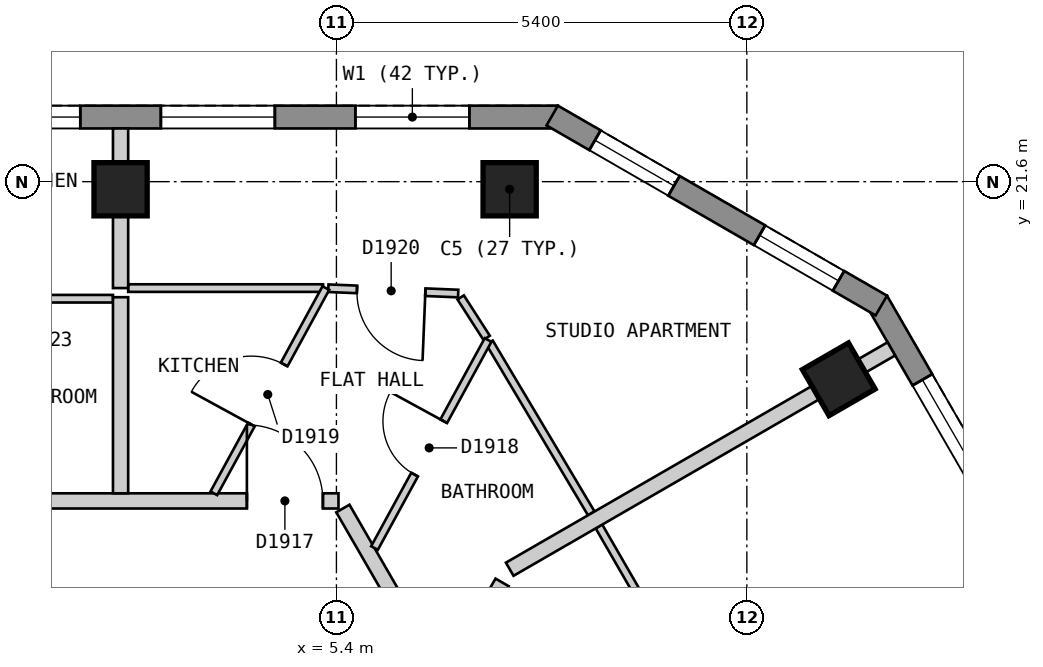
"""IFC4 building model, lengths in metres.
Left out: names, types, materials, properties, quantities, classifications, styles, units other than length and angle.
Written with IfcOpenShell. Run it as: python <this file> out.ifc"""

import sys

from ifc_helpers import new_model, si_unit, direction, frame, frame_2d, origin, origin_2d, place, context, subcontext, project, spatial, polyline, rectangle, outline, extrude, element, fill, save


model = new_model("IFC4")
c1 = context("Model", 3, precision=1e-05, world=origin(), true_north=direction((0.0, 1.0)))
c2 = subcontext(c1, "Body", "Model", "MODEL_VIEW")
j1 = project(units=[si_unit("LENGTHUNIT", "METRE"), si_unit("PLANEANGLEUNIT", "RADIAN")], contexts=[c1])
p1 = place(None, origin())
s1 = spatial("IfcSite", under=j1, at=p1, CompositionType="ELEMENT")
p2 = place(p1, origin())
s2 = spatial("IfcBuilding", under=s1, at=p2, CompositionType="ELEMENT")
p3 = place(p2, frame((0.0, 0.0, 220.8)))
s3 = spatial("IfcBuildingStorey", under=s2, at=p3, CompositionType="ELEMENT", Elevation=220.8)
for number, where, z_axis, x_axis in (
    (1, (7.679, 21.5, 0.0), (0.0, 0.0, 1.0), (-1.0, 0.0, 0.0)),
    (2, (2.56, 21.5, 0.0), (0.0, 0.0, 1.0), (-1.0, 0.0, 0.0)),
    (3, (12.009, 19.0, 0.0), (0.0, 0.0, 1.0), (-0.5, 0.866, 0.0)),
):
    element("IfcColumn", number, at=place(p3, frame(where, z_axis=z_axis, x_axis=x_axis)), inside=s3, PredefinedType="COLUMN", context=c2, shape_type="SweptSolid", body=[
        extrude(rectangle(XDim=0.7, YDim=0.7, at=origin_2d()), origin(), (0.0, 0.0, 1.0), 3.0),
    ])
p4 = place(p3, frame((8.314, 22.45, 0.0), z_axis=(0.0, 0.0, 1.0), x_axis=(-1.0, 0.0, 0.0)))
e4 = element("IfcWall", 4, at=p4, inside=s3, PredefinedType="SOLIDWALL", context=c2, shape_type="SweptSolid", body=[
    extrude(outline(polyline([(0.0, -0.15), (16.628, -0.15), (16.548, 0.15), (0.08, 0.15), (0.0, -0.15)])), origin(), (0.0, 0.0, 1.0), 2.7),
])
p5 = place(p4, frame((1.165, 0.0, 0.15)))
e5 = element("IfcOpeningElement", 5, at=p5, cuts=e4, PredefinedType="OPENING", context=c2, shape_type="SweptSolid", body=[
    extrude(rectangle(XDim=1.5, YDim=2.1, at=frame_2d((0.75, 1.05))), frame((0.0, 0.16, 0.0), z_axis=(0.0, -1.0, 0.0), x_axis=(1.0, 0.0, 0.0)), (0.0, 0.0, 1.0), 0.32),
])
p6 = place(p4, frame((3.724, 0.0, 0.15)))
e6 = element("IfcOpeningElement", 6, at=p6, cuts=e4, PredefinedType="OPENING", context=c2, shape_type="SweptSolid", body=[
    extrude(rectangle(XDim=1.5, YDim=2.1, at=frame_2d((0.75, 1.05))), frame((0.0, 0.16, 0.0), z_axis=(0.0, -1.0, 0.0), x_axis=(1.0, 0.0, 0.0)), (0.0, 0.0, 1.0), 0.32),
])
p7 = place(p4, frame((6.284, 0.0, 0.15)))
e7 = element("IfcOpeningElement", 7, at=p7, cuts=e4, PredefinedType="OPENING", context=c2, shape_type="SweptSolid", body=[
    extrude(rectangle(XDim=1.5, YDim=2.1, at=frame_2d((0.75, 1.05))), frame((0.0, 0.16, 0.0), z_axis=(0.0, -1.0, 0.0), x_axis=(1.0, 0.0, 0.0)), (0.0, 0.0, 1.0), 0.32),
])
p8 = place(p4, frame((8.843, 0.0, 0.15)))
e8 = element("IfcOpeningElement", 8, at=p8, cuts=e4, PredefinedType="OPENING", context=c2, shape_type="SweptSolid", body=[
    extrude(rectangle(XDim=1.5, YDim=2.1, at=frame_2d((0.75, 1.05))), frame((0.0, 0.16, 0.0), z_axis=(0.0, -1.0, 0.0), x_axis=(1.0, 0.0, 0.0)), (0.0, 0.0, 1.0), 0.32),
])
p9 = place(p4, frame((11.403, 0.0, 0.15)))
e9 = element("IfcOpeningElement", 9, at=p9, cuts=e4, PredefinedType="OPENING", context=c2, shape_type="SweptSolid", body=[
    extrude(rectangle(XDim=1.5, YDim=2.1, at=frame_2d((0.75, 1.05))), frame((0.0, 0.16, 0.0), z_axis=(0.0, -1.0, 0.0), x_axis=(1.0, 0.0, 0.0)), (0.0, 0.0, 1.0), 0.32),
])
p10 = place(p4, frame((13.962, 0.0, 0.15)))
e10 = element("IfcOpeningElement", 10, at=p10, cuts=e4, PredefinedType="OPENING", context=c2, shape_type="SweptSolid", body=[
    extrude(rectangle(XDim=1.5, YDim=2.1, at=frame_2d((0.75, 1.05))), frame((0.0, 0.16, 0.0), z_axis=(0.0, -1.0, 0.0), x_axis=(1.0, 0.0, 0.0)), (0.0, 0.0, 1.0), 0.32),
])
p11 = place(p3, frame((23.599, 0.825, 0.0), z_axis=(0.0, 0.0, 1.0), x_axis=(-0.500003656944, 0.866023292436, 0.0)))
e11 = element("IfcWall", 11, at=p11, inside=s3, PredefinedType="SOLIDWALL", context=c2, shape_type="SweptSolid", body=[
    extrude(outline(polyline([(0.0, -0.15), (22.17, -0.15), (22.09, 0.15), (0.08, 0.15), (0.0, -0.15)])), origin(), (0.0, 0.0, 1.0), 2.7),
])
p12 = place(p11, frame((1.191, 0.0, 0.15)))
e12 = element("IfcOpeningElement", 12, at=p12, cuts=e11, PredefinedType="OPENING", context=c2, shape_type="SweptSolid", body=[
    extrude(rectangle(XDim=1.5, YDim=2.1, at=frame_2d((0.75, 1.05))), frame((0.0, 0.16, 0.0), z_axis=(0.0, -1.0, 0.0), x_axis=(1.0, 0.0, 0.0)), (0.0, 0.0, 1.0), 0.32),
])
p13 = place(p11, frame((3.804, 0.0, 0.15)))
e13 = element("IfcOpeningElement", 13, at=p13, cuts=e11, PredefinedType="OPENING", context=c2, shape_type="SweptSolid", body=[
    extrude(rectangle(XDim=1.5, YDim=2.1, at=frame_2d((0.75, 1.05))), frame((0.0, 0.16, 0.0), z_axis=(0.0, -1.0, 0.0), x_axis=(1.0, 0.0, 0.0)), (0.0, 0.0, 1.0), 0.32),
])
p14 = place(p11, frame((6.417, 0.0, 0.15)))
e14 = element("IfcOpeningElement", 14, at=p14, cuts=e11, PredefinedType="OPENING", context=c2, shape_type="SweptSolid", body=[
    extrude(rectangle(XDim=1.5, YDim=2.1, at=frame_2d((0.75, 1.05))), frame((0.0, 0.16, 0.0), z_axis=(0.0, -1.0, 0.0), x_axis=(1.0, 0.0, 0.0)), (0.0, 0.0, 1.0), 0.32),
])
p15 = place(p11, frame((9.029, 0.0, 0.15)))
e15 = element("IfcOpeningElement", 15, at=p15, cuts=e11, PredefinedType="OPENING", context=c2, shape_type="SweptSolid", body=[
    extrude(rectangle(XDim=1.5, YDim=2.1, at=frame_2d((0.75, 1.05))), frame((0.0, 0.16, 0.0), z_axis=(0.0, -1.0, 0.0), x_axis=(1.0, 0.0, 0.0)), (0.0, 0.0, 1.0), 0.32),
])
p16 = place(p11, frame((11.641, 0.0, 0.15)))
e16 = element("IfcOpeningElement", 16, at=p16, cuts=e11, PredefinedType="OPENING", context=c2, shape_type="SweptSolid", body=[
    extrude(rectangle(XDim=1.5, YDim=2.1, at=frame_2d((0.75, 1.05))), frame((0.0, 0.16, 0.0), z_axis=(0.0, -1.0, 0.0), x_axis=(1.0, 0.0, 0.0)), (0.0, 0.0, 1.0), 0.32),
])
p17 = place(p11, frame((14.254, 0.0, 0.15)))
e17 = element("IfcOpeningElement", 17, at=p17, cuts=e11, PredefinedType="OPENING", context=c2, shape_type="SweptSolid", body=[
    extrude(rectangle(XDim=1.5, YDim=2.1, at=frame_2d((0.75, 1.05))), frame((0.0, 0.16, 0.0), z_axis=(0.0, -1.0, 0.0), x_axis=(1.0, 0.0, 0.0)), (0.0, 0.0, 1.0), 0.32),
])
p18 = place(p11, frame((16.866, 0.0, 0.15)))
e18 = element("IfcOpeningElement", 18, at=p18, cuts=e11, PredefinedType="OPENING", context=c2, shape_type="SweptSolid", body=[
    extrude(rectangle(XDim=1.5, YDim=2.1, at=frame_2d((0.75, 1.05))), frame((0.0, 0.16, 0.0), z_axis=(0.0, -1.0, 0.0), x_axis=(1.0, 0.0, 0.0)), (0.0, 0.0, 1.0), 0.32),
])
p19 = place(p11, frame((19.479, 0.0, 0.15)))
e19 = element("IfcOpeningElement", 19, at=p19, cuts=e11, PredefinedType="OPENING", context=c2, shape_type="SweptSolid", body=[
    extrude(rectangle(XDim=1.5, YDim=2.1, at=frame_2d((0.75, 1.05))), frame((0.0, 0.16, 0.0), z_axis=(0.0, -1.0, 0.0), x_axis=(1.0, 0.0, 0.0)), (0.0, 0.0, 1.0), 0.32),
])
p20 = place(p3, frame((12.569, 19.97, 0.0), z_axis=(0.0, 0.0, 1.0), x_axis=(-0.866022959057, 0.500004234368, 0.0)))
e20 = element("IfcWall", 20, at=p20, inside=s3, PredefinedType="SOLIDWALL", context=c2, shape_type="SweptSolid", body=[
    extrude(outline(polyline([(0.0, -0.15), (5.0, -0.15), (4.92, 0.15), (0.08, 0.15), (0.0, -0.15)])), origin(), (0.0, 0.0, 1.0), 2.7),
])
p21 = place(p20, frame((0.65, 0.0, 0.15)))
e21 = element("IfcOpeningElement", 21, at=p21, cuts=e20, PredefinedType="OPENING", context=c2, shape_type="SweptSolid", body=[
    extrude(rectangle(XDim=1.2, YDim=2.1, at=frame_2d((0.6, 1.05))), frame((0.0, 0.16, 0.0), z_axis=(0.0, -1.0, 0.0), x_axis=(1.0, 0.0, 0.0)), (0.0, 0.0, 1.0), 0.32),
])
p22 = place(p20, frame((3.15, 0.0, 0.15)))
e22 = element("IfcOpeningElement", 22, at=p22, cuts=e20, PredefinedType="OPENING", context=c2, shape_type="SweptSolid", body=[
    extrude(rectangle(XDim=1.2, YDim=2.1, at=frame_2d((0.6, 1.05))), frame((0.0, 0.16, 0.0), z_axis=(0.0, -1.0, 0.0), x_axis=(1.0, 0.0, 0.0)), (0.0, 0.0, 1.0), 0.32),
])
p23 = place(p3, frame((5.485, 17.3, 0.0), z_axis=(0.0, 0.0, 1.0), x_axis=(0.499943285704, -0.866058145322, 0.0)))
e23 = element("IfcWall", 23, at=p23, inside=s3, PredefinedType="PARTITIONING", context=c2, shape_type="SweptSolid", body=[
    extrude(rectangle(XDim=10.623, YDim=0.2, at=frame_2d((5.312, 0.0))), origin(), (0.0, 0.0, 1.0), 2.7),
])
p24 = place(p23, frame((3.901, 0.0, 0.0)))
e24 = element("IfcOpeningElement", 24, at=p24, cuts=e23, PredefinedType="OPENING", context=c2, shape_type="SweptSolid", body=[
    extrude(rectangle(XDim=1.0, YDim=2.1, at=frame_2d((0.5, 1.05))), frame((0.0, 0.11, 0.0), z_axis=(0.0, -1.0, 0.0), x_axis=(1.0, 0.0, 0.0)), (0.0, 0.0, 1.0), 0.22),
])
p25 = place(p3, frame((-5.312, 17.4, 0.0), z_axis=(0.0, 0.0, 1.0), x_axis=(1.0, 0.0, 0.0)))
e25 = element("IfcWall", 25, at=p25, inside=s3, PredefinedType="PARTITIONING", context=c2, shape_type="SweptSolid", body=[
    extrude(rectangle(XDim=10.739, YDim=0.2, at=frame_2d((5.37, 0.0))), origin(), (0.0, 0.0, 1.0), 2.7),
])
p26 = place(p25, frame((9.534, 0.0, 0.0)))
e26 = element("IfcOpeningElement", 26, at=p26, cuts=e25, PredefinedType="OPENING", context=c2, shape_type="SweptSolid", body=[
    extrude(rectangle(XDim=1.0, YDim=2.1, at=frame_2d((0.5, 1.05))), frame((0.0, 0.11, 0.0), z_axis=(0.0, -1.0, 0.0), x_axis=(1.0, 0.0, 0.0)), (0.0, 0.0, 1.0), 0.22),
])
p27 = place(p25, frame((4.812, 0.0, 0.0)))
e27 = element("IfcOpeningElement", 27, at=p27, cuts=e25, PredefinedType="OPENING", context=c2, shape_type="SweptSolid", body=[
    extrude(rectangle(XDim=1.0, YDim=2.1, at=frame_2d((0.5, 1.05))), frame((0.0, 0.11, 0.0), z_axis=(0.0, -1.0, 0.0), x_axis=(1.0, 0.0, 0.0)), (0.0, 0.0, 1.0), 0.22),
])
p28 = place(p25, frame((0.208, 0.0, 0.0)))
e28 = element("IfcOpeningElement", 28, at=p28, cuts=e25, PredefinedType="OPENING", context=c2, shape_type="SweptSolid", body=[
    extrude(rectangle(XDim=0.8, YDim=2.1, at=frame_2d((0.4, 1.05))), frame((0.0, 0.11, 0.0), z_axis=(0.0, -1.0, 0.0), x_axis=(1.0, 0.0, 0.0)), (0.0, 0.0, 1.0), 0.22),
])
p29 = place(p3, frame((7.035, 20.077, 0.0), z_axis=(0.0, 0.0, 1.0), x_axis=(0.540425167977, -0.841392083286, 0.0)))
e29 = element("IfcWall", 29, at=p29, inside=s3, PredefinedType="PARTITIONING", context=c2, shape_type="SweptSolid", body=[
    extrude(rectangle(XDim=0.631, YDim=0.1, at=frame_2d((0.315, 0.0))), origin(), (0.0, 0.0, 1.0), 2.7),
])
p30 = place(p3, frame((7.414, 19.484, 0.0), z_axis=(0.0, 0.0, 1.0), x_axis=(0.511734837015, -0.859143443544, 0.0)))
e30 = element("IfcWall", 30, at=p30, inside=s3, PredefinedType="PARTITIONING", context=c2, shape_type="SweptSolid", body=[
    extrude(rectangle(XDim=2.616, YDim=0.1, at=frame_2d((1.308, 0.0))), origin(), (0.0, 0.0, 1.0), 2.7),
])
p31 = place(p3, frame((8.854, 17.064, 0.0), z_axis=(0.0, 0.0, 1.0), x_axis=(0.500042049778, -0.866001124973, 0.0)))
e31 = element("IfcWall", 31, at=p31, inside=s3, PredefinedType="PARTITIONING", context=c2, shape_type="SweptSolid", body=[
    extrude(rectangle(XDim=5.025, YDim=0.1, at=frame_2d((2.513, 0.0))), origin(), (0.0, 0.0, 1.0), 2.7),
])
p32 = place(p31, frame((2.063, 0.0, 0.0)))
e32 = element("IfcOpeningElement", 32, at=p32, cuts=e31, PredefinedType="OPENING", context=c2, shape_type="SweptSolid", body=[
    extrude(rectangle(XDim=0.9, YDim=2.1, at=frame_2d((0.45, 1.05))), frame((0.0, 0.06, 0.0), z_axis=(0.0, -1.0, 0.0), x_axis=(1.0, 0.0, 0.0)), (0.0, 0.0, 1.0), 0.12),
])
p33 = place(p3, frame((5.294, 20.198, 0.0), z_axis=(0.0, 0.0, 1.0), x_axis=(0.999159599203, -0.040988965834, 0.0)))
e33 = element("IfcWall", 33, at=p33, inside=s3, PredefinedType="PARTITIONING", context=c2, shape_type="SweptSolid", body=[
    extrude(rectangle(XDim=1.709, YDim=0.1, at=frame_2d((0.855, 0.0))), origin(), (0.0, 0.0, 1.0), 2.7),
])
p34 = place(p33, frame((0.377, 0.0, 0.0)))
e34 = element("IfcOpeningElement", 34, at=p34, cuts=e33, PredefinedType="OPENING", context=c2, shape_type="SweptSolid", body=[
    extrude(rectangle(XDim=0.9, YDim=2.1, at=frame_2d((0.45, 1.05))), frame((0.0, 0.06, 0.0), z_axis=(0.0, -1.0, 0.0), x_axis=(1.0, 0.0, 0.0)), (0.0, 0.0, 1.0), 0.12),
])
p35 = place(p3, frame((-0.716, 20.06, 0.0), z_axis=(0.0, 0.0, 1.0), x_axis=(1.0, 0.0, 0.0)))
e35 = element("IfcWall", 35, at=p35, inside=s3, PredefinedType="PARTITIONING", context=c2, shape_type="SweptSolid", body=[
    extrude(rectangle(XDim=3.176, YDim=0.1, at=frame_2d((1.588, 0.0))), origin(), (0.0, 0.0, 1.0), 2.7),
])
p36 = place(p3, frame((2.66, 20.2, 0.0), z_axis=(0.0, 0.0, 1.0), x_axis=(1.0, 0.0, 0.0)))
e36 = element("IfcWall", 36, at=p36, inside=s3, PredefinedType="PARTITIONING", context=c2, shape_type="SweptSolid", body=[
    extrude(rectangle(XDim=2.564, YDim=0.1, at=frame_2d((1.282, 0.0))), origin(), (0.0, 0.0, 1.0), 2.7),
])
p37 = place(p3, frame((3.787, 17.5, 0.0), z_axis=(0.0, 0.0, 1.0), x_axis=(0.479146828267, 0.877734764585, 0.0)))
e37 = element("IfcWall", 37, at=p37, inside=s3, PredefinedType="PARTITIONING", context=c2, shape_type="SweptSolid", body=[
    extrude(rectangle(XDim=3.076, YDim=0.1, at=frame_2d((1.538, 0.0))), origin(), (0.0, 0.0, 1.0), 2.7),
])
p38 = place(p37, frame((1.031, 0.0, 0.0)))
e38 = element("IfcOpeningElement", 38, at=p38, cuts=e37, PredefinedType="OPENING", context=c2, shape_type="SweptSolid", body=[
    extrude(rectangle(XDim=0.9, YDim=2.1, at=frame_2d((0.45, 1.05))), frame((0.0, 0.06, 0.0), z_axis=(0.0, -1.0, 0.0), x_axis=(1.0, 0.0, 0.0)), (0.0, 0.0, 1.0), 0.12),
])
p39 = place(p3, frame((5.901, 16.78, 0.0), z_axis=(0.0, 0.0, 1.0), x_axis=(0.479148317257, 0.877733951759, 0.0)))
e39 = element("IfcWall", 39, at=p39, inside=s3, PredefinedType="PARTITIONING", context=c2, shape_type="SweptSolid", body=[
    extrude(rectangle(XDim=3.118, YDim=0.1, at=frame_2d((1.559, 0.0))), origin(), (0.0, 0.0, 1.0), 2.7),
])
p40 = place(p39, frame((1.101, 0.0, 0.0)))
e40 = element("IfcOpeningElement", 40, at=p40, cuts=e39, PredefinedType="OPENING", context=c2, shape_type="SweptSolid", body=[
    extrude(rectangle(XDim=0.8, YDim=2.1, at=frame_2d((0.4, 1.05))), frame((0.0, 0.06, 0.0), z_axis=(0.0, -1.0, 0.0), x_axis=(1.0, 0.0, 0.0)), (0.0, 0.0, 1.0), 0.12),
])
p41 = place(p3, frame((2.56, 20.08, 0.0), z_axis=(0.0, 0.0, 1.0), x_axis=(0.0, -1.0, 0.0)))
e41 = element("IfcWall", 41, at=p41, inside=s3, PredefinedType="PARTITIONING", context=c2, shape_type="SweptSolid", body=[
    extrude(rectangle(XDim=2.58, YDim=0.2, at=frame_2d((1.29, 0.0))), origin(), (0.0, 0.0, 1.0), 2.7),
])
p42 = place(p3, frame((6.871, 15.1, 0.0), z_axis=(0.0, 0.0, 1.0), x_axis=(0.50006528296, 0.865987709369, 0.0)))
e42 = element("IfcWall", 42, at=p42, inside=s3, PredefinedType="PARTITIONING", context=c2, shape_type="SweptSolid", body=[
    extrude(rectangle(XDim=1.418, YDim=0.2, at=frame_2d((0.709, 0.0))), origin(), (0.0, 0.0, 1.0), 2.7),
])
p43 = place(p3, frame((2.56, 20.2, 0.0), z_axis=(0.0, 0.0, 1.0), x_axis=(0.0, 1.0, 0.0)))
e43 = element("IfcWall", 43, at=p43, inside=s3, PredefinedType="PARTITIONING", context=c2, shape_type="SweptSolid", body=[
    extrude(rectangle(XDim=2.1, YDim=0.2, at=frame_2d((1.05, 0.0))), origin(), (0.0, 0.0, 1.0), 2.7),
])
p44 = place(p3, frame((7.68, 16.501, 0.0), z_axis=(0.0, 0.0, 1.0), x_axis=(0.86602149507, 0.500006770031, 0.0)))
e44 = element("IfcWall", 44, at=p44, inside=s3, PredefinedType="PARTITIONING", context=c2, shape_type="SweptSolid", body=[
    extrude(rectangle(XDim=5.798, YDim=0.2, at=frame_2d((2.899, 0.0))), origin(), (0.0, 0.0, 1.0), 2.7),
])
p45 = place(p5, origin())
e45 = element("IfcWindow", 45, at=p45, inside=s3, PartitioningType="SINGLE_PANEL", PredefinedType="WINDOW", context=c2, shape_type="SweptSolid", body=[
    extrude(rectangle(XDim=1.5, YDim=2.1, at=frame_2d((0.75, 1.05))), frame((0.0, 0.03, 0.0), z_axis=(0.0, -1.0, 0.0), x_axis=(1.0, 0.0, 0.0)), (0.0, 0.0, 1.0), 0.06),
])
fill(e5, e45)
p46 = place(p6, origin())
e46 = element("IfcWindow", 46, at=p46, inside=s3, PartitioningType="SINGLE_PANEL", PredefinedType="WINDOW", context=c2, shape_type="SweptSolid", body=[
    extrude(rectangle(XDim=1.5, YDim=2.1, at=frame_2d((0.75, 1.05))), frame((0.0, 0.03, 0.0), z_axis=(0.0, -1.0, 0.0), x_axis=(1.0, 0.0, 0.0)), (0.0, 0.0, 1.0), 0.06),
])
fill(e6, e46)
p47 = place(p7, origin())
e47 = element("IfcWindow", 47, at=p47, inside=s3, PartitioningType="SINGLE_PANEL", PredefinedType="WINDOW", context=c2, shape_type="SweptSolid", body=[
    extrude(rectangle(XDim=1.5, YDim=2.1, at=frame_2d((0.75, 1.05))), frame((0.0, 0.03, 0.0), z_axis=(0.0, -1.0, 0.0), x_axis=(1.0, 0.0, 0.0)), (0.0, 0.0, 1.0), 0.06),
])
fill(e7, e47)
p48 = place(p19, origin())
e48 = element("IfcWindow", 48, at=p48, inside=s3, PartitioningType="SINGLE_PANEL", PredefinedType="WINDOW", context=c2, shape_type="SweptSolid", body=[
    extrude(rectangle(XDim=1.5, YDim=2.1, at=frame_2d((0.75, 1.05))), frame((0.0, 0.03, 0.0), z_axis=(0.0, -1.0, 0.0), x_axis=(1.0, 0.0, 0.0)), (0.0, 0.0, 1.0), 0.06),
])
fill(e19, e48)
p49 = place(p21, origin())
e49 = element("IfcWindow", 49, at=p49, inside=s3, PartitioningType="SINGLE_PANEL", PredefinedType="WINDOW", context=c2, shape_type="SweptSolid", body=[
    extrude(rectangle(XDim=1.2, YDim=2.1, at=frame_2d((0.6, 1.05))), frame((0.0, 0.03, 0.0), z_axis=(0.0, -1.0, 0.0), x_axis=(1.0, 0.0, 0.0)), (0.0, 0.0, 1.0), 0.06),
])
fill(e21, e49)
p50 = place(p22, origin())
e50 = element("IfcWindow", 50, at=p50, inside=s3, PartitioningType="SINGLE_PANEL", PredefinedType="WINDOW", context=c2, shape_type="SweptSolid", body=[
    extrude(rectangle(XDim=1.2, YDim=2.1, at=frame_2d((0.6, 1.05))), frame((0.0, 0.03, 0.0), z_axis=(0.0, -1.0, 0.0), x_axis=(1.0, 0.0, 0.0)), (0.0, 0.0, 1.0), 0.06),
])
fill(e22, e50)
p51 = place(p26, origin())
e51 = element("IfcDoor", 51, at=p51, inside=s3, OperationType="SINGLE_SWING_LEFT", PredefinedType="DOOR", context=c2, shape_type="SweptSolid", body=[
    extrude(rectangle(XDim=1.0, YDim=2.1, at=frame_2d((0.5, 1.05))), frame((0.0, 0.025, 0.0), z_axis=(0.0, -1.0, 0.0), x_axis=(1.0, 0.0, 0.0)), (0.0, 0.0, 1.0), 0.05),
])
fill(e26, e51)
p52 = place(p40, origin())
e52 = element("IfcDoor", 52, at=p52, inside=s3, OperationType="SINGLE_SWING_RIGHT", PredefinedType="DOOR", context=c2, shape_type="SweptSolid", body=[
    extrude(rectangle(XDim=0.8, YDim=2.1, at=frame_2d((0.4, 1.05))), frame((0.0, 0.025, 0.0), z_axis=(0.0, -1.0, 0.0), x_axis=(1.0, 0.0, 0.0)), (0.0, 0.0, 1.0), 0.05),
])
fill(e40, e52)
p53 = place(p38, origin())
e53 = element("IfcDoor", 53, at=p53, inside=s3, OperationType="SINGLE_SWING_LEFT", PredefinedType="DOOR", context=c2, shape_type="SweptSolid", body=[
    extrude(rectangle(XDim=0.9, YDim=2.1, at=frame_2d((0.45, 1.05))), frame((0.0, 0.025, 0.0), z_axis=(0.0, -1.0, 0.0), x_axis=(1.0, 0.0, 0.0)), (0.0, 0.0, 1.0), 0.05),
])
fill(e38, e53)
p54 = place(p34, origin())
e54 = element("IfcDoor", 54, at=p54, inside=s3, OperationType="SINGLE_SWING_RIGHT", PredefinedType="DOOR", context=c2, shape_type="SweptSolid", body=[
    extrude(rectangle(XDim=0.9, YDim=2.1, at=frame_2d((0.45, 1.05))), frame((0.0, 0.025, 0.0), z_axis=(0.0, -1.0, 0.0), x_axis=(1.0, 0.0, 0.0)), (0.0, 0.0, 1.0), 0.05),
])
fill(e34, e54)
save(model, sys.argv[1])
